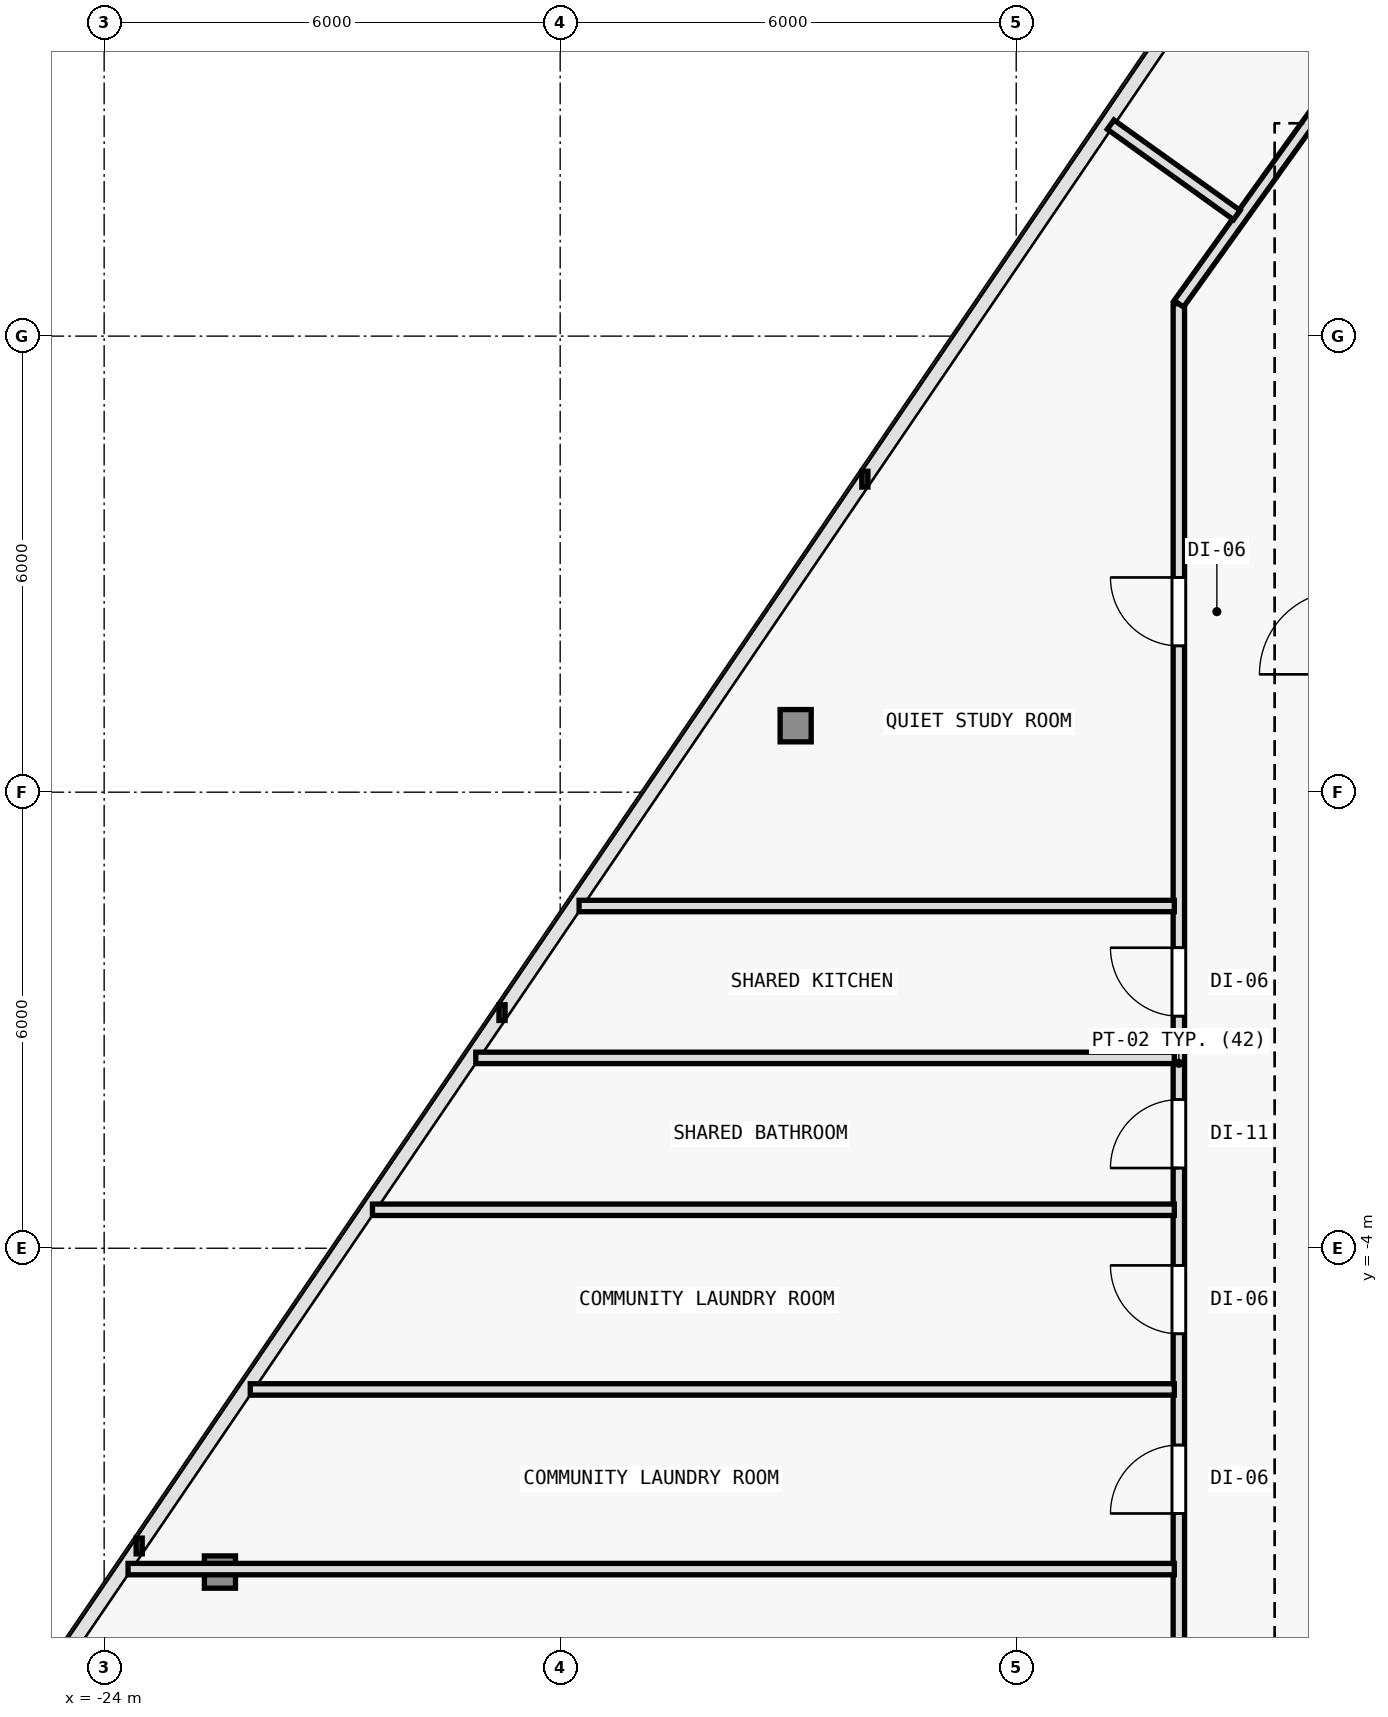
"""IFC4 building model, lengths in metres.
Left out: names, types, materials, properties, quantities, classifications, styles, units other than length and angle.
Written with IfcOpenShell. Run it as: python <this file> out.ifc"""

import sys

from ifc_helpers import new_model, si_unit, direction, frame, frame_2d, origin, origin_2d, place, context, subcontext, project, spatial, rectangle, i_section, extrude, element, fill, save


model = new_model("IFC4")
c1 = context("Model", 3, precision=1e-05, world=origin(), true_north=direction((0.0, 1.0)))
c2 = subcontext(c1, "Body", "Model", "MODEL_VIEW")
j1 = project(units=[si_unit("LENGTHUNIT", "METRE"), si_unit("PLANEANGLEUNIT", "RADIAN")], contexts=[c1])
p1 = place(None, origin())
s1 = spatial("IfcSite", under=j1, at=p1, CompositionType="ELEMENT")
p2 = place(p1, origin())
s2 = spatial("IfcBuilding", under=s1, at=p2, CompositionType="ELEMENT")
p3 = place(p2, frame((0.0, 0.0, 104.1)))
s3 = spatial("IfcBuildingStorey", under=s2, at=p3, CompositionType="ELEMENT", Elevation=104.1)
p4 = place(p3, frame((-14.902, 2.875, 0.005), z_axis=(0.01700241672, 0.009521353363, 0.999810112799), x_axis=(-0.488603368932, 0.87250601595, 0.0)))
e1 = element("IfcColumn", 1, at=p4, inside=s3, PredefinedType="COLUMN", context=c2, shape_type="SweptSolid", body=[
    extrude(i_section(OverallWidth=0.409, OverallDepth=0.425, WebThickness=0.021, FlangeThickness=0.034, FilletRadius=0.015, at=origin_2d()), origin(), (0.0, 0.0, 1.0), 3.59),
])
p5 = place(p3, frame((-22.477, -8.26, 0.005), z_axis=(0.025222486673, 0.021551289152, 0.999449532544), x_axis=(-0.649609258817, 0.760268249278, 0.0)))
e2 = element("IfcColumn", 2, at=p5, inside=s3, PredefinedType="COLUMN", context=c2, shape_type="SweptSolid", body=[
    extrude(i_section(OverallWidth=0.409, OverallDepth=0.425, WebThickness=0.021, FlangeThickness=0.034, FilletRadius=0.015, at=origin_2d()), origin(), (0.0, 0.0, 1.0), 3.591),
])
p6 = place(p3, frame((-9.86, -11.56, 0.0), z_axis=(0.0, 0.0, 1.0), x_axis=(0.0, 1.0, 0.0)))
e3 = element("IfcWall", 3, at=p6, inside=s3, PredefinedType="PARTITIONING", context=c2, shape_type="SweptSolid", body=[
    extrude(rectangle(XDim=19.986, YDim=0.15, at=frame_2d((9.993, 0.0))), origin(), (0.0, 0.0, 1.0), 2.705),
])
p7 = place(p6, frame((10.614, 0.0, 0.0)))
e4 = element("IfcOpeningElement", 4, at=p7, cuts=e3, PredefinedType="OPENING", context=c2, shape_type="SweptSolid", body=[
    extrude(rectangle(XDim=0.9, YDim=2.1, at=frame_2d((0.45, 1.05))), frame((0.0, 0.085, 0.0), z_axis=(0.0, -1.0, 0.0), x_axis=(1.0, 0.0, 0.0)), (0.0, 0.0, 1.0), 0.17),
])
p8 = place(p6, frame((8.615, 0.0, 0.0)))
e5 = element("IfcOpeningElement", 5, at=p8, cuts=e3, PredefinedType="OPENING", context=c2, shape_type="SweptSolid", body=[
    extrude(rectangle(XDim=0.9, YDim=2.1, at=frame_2d((0.45, 1.05))), frame((0.0, 0.085, 0.0), z_axis=(0.0, -1.0, 0.0), x_axis=(1.0, 0.0, 0.0)), (0.0, 0.0, 1.0), 0.17),
])
p9 = place(p6, frame((6.434, 0.0, 0.0)))
e6 = element("IfcOpeningElement", 6, at=p9, cuts=e3, PredefinedType="OPENING", context=c2, shape_type="SweptSolid", body=[
    extrude(rectangle(XDim=0.9, YDim=2.1, at=frame_2d((0.45, 1.05))), frame((0.0, 0.085, 0.0), z_axis=(0.0, -1.0, 0.0), x_axis=(1.0, 0.0, 0.0)), (0.0, 0.0, 1.0), 0.17),
])
p10 = place(p6, frame((4.071, 0.0, 0.0)))
e7 = element("IfcOpeningElement", 7, at=p10, cuts=e3, PredefinedType="OPENING", context=c2, shape_type="SweptSolid", body=[
    extrude(rectangle(XDim=0.9, YDim=2.1, at=frame_2d((0.45, 1.05))), frame((0.0, 0.085, 0.0), z_axis=(0.0, -1.0, 0.0), x_axis=(1.0, 0.0, 0.0)), (0.0, 0.0, 1.0), 0.17),
])
p11 = place(p6, frame((15.485, 0.0, 0.0)))
e8 = element("IfcOpeningElement", 8, at=p11, cuts=e3, PredefinedType="OPENING", context=c2, shape_type="SweptSolid", body=[
    extrude(rectangle(XDim=0.9, YDim=2.1, at=frame_2d((0.45, 1.05))), frame((0.0, 0.085, 0.0), z_axis=(0.0, -1.0, 0.0), x_axis=(1.0, 0.0, 0.0)), (0.0, 0.0, 1.0), 0.17),
])
p12 = place(p3, frame((-9.86, 8.426, 0.0), z_axis=(0.0, 0.0, 1.0), x_axis=(0.582449511476, 0.812866881218, 0.0)))
e9 = element("IfcWall", 9, at=p12, inside=s3, PredefinedType="PARTITIONING", context=c2, shape_type="SweptSolid", body=[
    extrude(rectangle(XDim=4.84, YDim=0.15, at=frame_2d((2.42, 0.0))), origin(), (0.0, 0.0, 1.0), 2.725),
])
p13 = place(p3, frame((-9.92, -8.221, 0.0), z_axis=(0.0, 0.0, 1.0), x_axis=(-1.0, 0.0, 0.0)))
e10 = element("IfcWall", 10, at=p13, inside=s3, PredefinedType="PARTITIONING", context=c2, shape_type="SweptSolid", body=[
    extrude(rectangle(XDim=13.766, YDim=0.15, at=frame_2d((6.883, 0.0))), origin(), (0.0, 0.0, 1.0), 2.705),
])
p14 = place(p3, frame((-9.92, 0.502, 0.0), z_axis=(0.0, 0.0, 1.0), x_axis=(-1.0, 0.0, 0.0)))
e11 = element("IfcWall", 11, at=p14, inside=s3, PredefinedType="PARTITIONING", context=c2, shape_type="SweptSolid", body=[
    extrude(rectangle(XDim=7.831, YDim=0.15, at=frame_2d((3.916, 0.0))), origin(), (0.0, 0.0, 1.0), 2.775),
])
p15 = place(p3, frame((-9.92, -3.494, 0.0), z_axis=(0.0, 0.0, 1.0), x_axis=(-1.0, 0.0, 0.0)))
e12 = element("IfcWall", 12, at=p15, inside=s3, PredefinedType="PARTITIONING", context=c2, shape_type="SweptSolid", body=[
    extrude(rectangle(XDim=10.55, YDim=0.15, at=frame_2d((5.275, 0.0))), origin(), (0.0, 0.0, 1.0), 2.775),
])
p16 = place(p3, frame((-9.097, 9.593, 0.0), z_axis=(0.0, 0.0, 1.0), x_axis=(-0.812933133041, 0.582357039285, 0.0)))
e13 = element("IfcWall", 13, at=p16, inside=s3, PredefinedType="PARTITIONING", context=c2, shape_type="SweptSolid", body=[
    extrude(rectangle(XDim=2.042, YDim=0.15, at=frame_2d((1.021, 0.0))), origin(), (0.0, 0.0, 1.0), 2.835),
])
p17 = place(p3, frame((-9.92, -1.496, 0.0), z_axis=(0.0, 0.0, 1.0), x_axis=(-1.0, 0.0, 0.0)))
e14 = element("IfcWall", 14, at=p17, inside=s3, PredefinedType="PARTITIONING", context=c2, shape_type="SweptSolid", body=[
    extrude(rectangle(XDim=9.19, YDim=0.15, at=frame_2d((4.595, 0.0))), origin(), (0.0, 0.0, 1.0), 2.775),
])
p18 = place(p3, frame((-9.92, -5.857, 0.0), z_axis=(0.0, 0.0, 1.0), x_axis=(-1.0, 0.0, 0.0)))
e15 = element("IfcWall", 15, at=p18, inside=s3, PredefinedType="PARTITIONING", context=c2, shape_type="SweptSolid", body=[
    extrude(rectangle(XDim=12.158, YDim=0.15, at=frame_2d((6.079, 0.0))), origin(), (0.0, 0.0, 1.0), 2.775),
])
p19 = place(p7, origin())
e16 = element("IfcDoor", 16, at=p19, inside=s3, OperationType="SINGLE_SWING_RIGHT", PredefinedType="DOOR", context=c2, shape_type="SweptSolid", body=[
    extrude(rectangle(XDim=0.9, YDim=2.1, at=frame_2d((0.45, 1.05))), frame((0.0, 0.025, 0.0), z_axis=(0.0, -1.0, 0.0), x_axis=(1.0, 0.0, 0.0)), (0.0, 0.0, 1.0), 0.05),
])
fill(e4, e16)
p20 = place(p8, origin())
e17 = element("IfcDoor", 17, at=p20, inside=s3, OperationType="SINGLE_SWING_LEFT", PredefinedType="DOOR", context=c2, shape_type="SweptSolid", body=[
    extrude(rectangle(XDim=0.9, YDim=2.1, at=frame_2d((0.45, 1.05))), frame((0.0, 0.025, 0.0), z_axis=(0.0, -1.0, 0.0), x_axis=(1.0, 0.0, 0.0)), (0.0, 0.0, 1.0), 0.05),
])
fill(e5, e17)
p21 = place(p9, origin())
e18 = element("IfcDoor", 18, at=p21, inside=s3, OperationType="SINGLE_SWING_RIGHT", PredefinedType="DOOR", context=c2, shape_type="SweptSolid", body=[
    extrude(rectangle(XDim=0.9, YDim=2.1, at=frame_2d((0.45, 1.05))), frame((0.0, 0.025, 0.0), z_axis=(0.0, -1.0, 0.0), x_axis=(1.0, 0.0, 0.0)), (0.0, 0.0, 1.0), 0.05),
])
fill(e6, e18)
p22 = place(p10, origin())
e19 = element("IfcDoor", 19, at=p22, inside=s3, OperationType="SINGLE_SWING_LEFT", PredefinedType="DOOR", context=c2, shape_type="SweptSolid", body=[
    extrude(rectangle(XDim=0.9, YDim=2.1, at=frame_2d((0.45, 1.05))), frame((0.0, 0.025, 0.0), z_axis=(0.0, -1.0, 0.0), x_axis=(1.0, 0.0, 0.0)), (0.0, 0.0, 1.0), 0.05),
])
fill(e7, e19)
p23 = place(p11, origin())
e20 = element("IfcDoor", 20, at=p23, inside=s3, OperationType="SINGLE_SWING_RIGHT", PredefinedType="DOOR", context=c2, shape_type="SweptSolid", body=[
    extrude(rectangle(XDim=0.9, YDim=2.1, at=frame_2d((0.45, 1.05))), frame((0.0, 0.025, 0.0), z_axis=(0.0, -1.0, 0.0), x_axis=(1.0, 0.0, 0.0)), (0.0, 0.0, 1.0), 0.05),
])
fill(e8, e20)
save(model, sys.argv[1])
